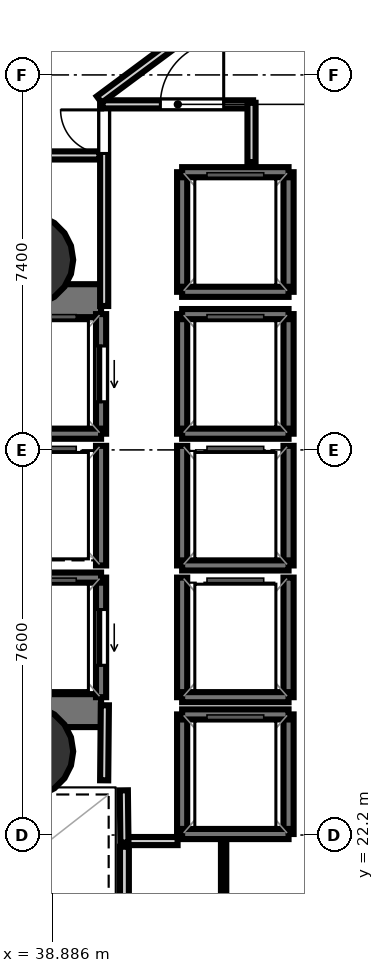
"""IFC4 building model, lengths in metres.
Left out: names, types, materials, properties, quantities, classifications, styles, units other than length and angle.
Written with IfcOpenShell. Run it as: python <this file> out.ifc"""

import sys

from ifc_helpers import new_model, si_unit, direction, frame, frame_2d, origin, origin_2d, place, context, subcontext, project, spatial, rectangle, hollow_circle, extrude, element, fill, save


model = new_model("IFC4")
c1 = context("Model", 3, precision=1e-05, world=origin(), true_north=direction((0.0, 1.0)))
c2 = subcontext(c1, "Body", "Model", "MODEL_VIEW")
j1 = project(units=[si_unit("LENGTHUNIT", "METRE"), si_unit("PLANEANGLEUNIT", "RADIAN")], contexts=[c1])
p1 = place(None, origin())
s1 = spatial("IfcSite", under=j1, at=p1, CompositionType="ELEMENT")
p2 = place(p1, origin())
s2 = spatial("IfcBuilding", under=s1, at=p2, CompositionType="ELEMENT")
p3 = place(p2, frame((0.0, 0.0, 44.2)))
s3 = spatial("IfcBuildingStorey", under=s2, at=p3, CompositionType="ELEMENT", Elevation=44.2)
p4 = place(p3, frame((29.13, 32.745, 0.0), z_axis=(0.0, 0.0, 1.0), x_axis=(1.0, 0.0, 0.0)))
e1 = element("IfcWall", 1, at=p4, inside=s3, PredefinedType="SHEAR", context=c2, shape_type="SweptSolid", body=[
    extrude(rectangle(XDim=10.72, YDim=0.65, at=frame_2d((5.36, 0.0))), origin(), (0.0, 0.0, 1.0), 3.4),
])
p5 = place(p4, frame((1.095, 0.0, 0.0)))
e2 = element("IfcOpeningElement", 2, at=p5, cuts=e1, PredefinedType="OPENING", context=c2, shape_type="SweptSolid", body=[
    extrude(rectangle(XDim=1.25, YDim=2.15, at=frame_2d((0.625, 1.075))), frame((0.0, 0.335, 0.0), z_axis=(0.0, -1.0, 0.0), x_axis=(1.0, 0.0, 0.0)), (0.0, 0.0, 1.0), 0.67),
])
p6 = place(p3, frame((29.13, 24.655, 0.0), z_axis=(0.0, 0.0, 1.0), x_axis=(1.0, 0.0, 0.0)))
e3 = element("IfcWall", 3, at=p6, inside=s3, PredefinedType="SHEAR", context=c2, shape_type="SweptSolid", body=[
    extrude(rectangle(XDim=10.72, YDim=0.65, at=frame_2d((5.36, 0.0))), origin(), (0.0, 0.0, 1.0), 3.4),
])
p7 = place(p6, frame((0.895, 0.0, 0.0)))
e4 = element("IfcOpeningElement", 4, at=p7, cuts=e3, PredefinedType="OPENING", context=c2, shape_type="SweptSolid", body=[
    extrude(rectangle(XDim=1.25, YDim=2.15, at=frame_2d((0.625, 1.075))), frame((0.0, 0.335, 0.0), z_axis=(0.0, -1.0, 0.0), x_axis=(1.0, 0.0, 0.0)), (0.0, 0.0, 1.0), 0.67),
])
for number, where, z_axis, x_axis in (
    (5, (38.4, 33.55, 0.0), (0.0, 0.0, 1.0), (1.0, 0.0, 0.0)),
    (6, (38.4, 23.85, 0.0), (0.0, 0.0, 1.0), (1.0, 0.0, 0.0)),
):
    element("IfcColumn", number, at=place(p3, frame(where, z_axis=z_axis, x_axis=x_axis)), inside=s3, PredefinedType="COLUMN", context=c2, shape_type="SweptSolid", body=[
        extrude(hollow_circle(Radius=0.9, WallThickness=0.045, at=origin_2d()), origin(), (0.0, 0.0, 1.0), 3.7),
    ])
p8 = place(p3, frame((39.85, 30.12, 0.0), z_axis=(0.0, 0.0, 1.0), x_axis=(0.0, 1.0, 0.0)))
e7 = element("IfcWall", 7, at=p8, inside=s3, PredefinedType="SOLIDWALL", context=c2, shape_type="SweptSolid", body=[
    extrude(rectangle(XDim=2.36, YDim=0.2, at=frame_2d((1.18, 0.0))), origin(), (0.0, 0.0, 1.0), 3.4),
])
p9 = place(p8, frame((0.63, 0.0, 0.0)))
e8 = element("IfcOpeningElement", 8, at=p9, cuts=e7, PredefinedType="OPENING", context=c2, shape_type="SweptSolid", body=[
    extrude(rectangle(XDim=1.1, YDim=2.15, at=frame_2d((0.55, 1.075))), frame((0.0, 0.11, 0.0), z_axis=(0.0, -1.0, 0.0), x_axis=(1.0, 0.0, 0.0)), (0.0, 0.0, 1.0), 0.22),
])
p10 = place(p3, frame((37.75, 30.12, 0.0), z_axis=(0.0, 0.0, 1.0), x_axis=(1.0, 0.0, 0.0)))
e9 = element("IfcWall", 9, at=p10, inside=s3, PredefinedType="SOLIDWALL", context=c2, shape_type="SweptSolid", body=[
    extrude(rectangle(XDim=2.1, YDim=0.2, at=frame_2d((1.05, 0.0))), origin(), (0.0, 0.0, 1.0), 3.4),
])
p11 = place(p3, frame((39.85, 24.92, 0.0), z_axis=(0.0, 0.0, 1.0), x_axis=(0.0, 1.0, 0.0)))
e10 = element("IfcWall", 10, at=p11, inside=s3, PredefinedType="SOLIDWALL", context=c2, shape_type="SweptSolid", body=[
    extrude(rectangle(XDim=2.36, YDim=0.2, at=frame_2d((1.18, 0.0))), origin(), (0.0, 0.0, 1.0), 3.4),
])
p12 = place(p11, frame((0.63, 0.0, 0.0)))
e11 = element("IfcOpeningElement", 11, at=p12, cuts=e10, PredefinedType="OPENING", context=c2, shape_type="SweptSolid", body=[
    extrude(rectangle(XDim=1.1, YDim=2.15, at=frame_2d((0.55, 1.075))), frame((0.0, 0.11, 0.0), z_axis=(0.0, -1.0, 0.0), x_axis=(1.0, 0.0, 0.0)), (0.0, 0.0, 1.0), 0.22),
])
p13 = place(p3, frame((37.75, 27.28, 0.0), z_axis=(0.0, 0.0, 1.0), x_axis=(1.0, 0.0, 0.0)))
e12 = element("IfcWall", 12, at=p13, inside=s3, PredefinedType="SOLIDWALL", context=c2, shape_type="SweptSolid", body=[
    extrude(rectangle(XDim=2.1, YDim=0.2, at=frame_2d((1.05, 0.0))), origin(), (0.0, 0.0, 1.0), 3.4),
])
for number, where, z_axis, x_axis in (
    (13, (43.55, 30.12, 0.0), (0.0, 0.0, 1.0), (0.0, 1.0, 0.0)),
    (14, (41.45, 30.12, 0.0), (0.0, 0.0, 1.0), (0.0, 1.0, 0.0)),
):
    element("IfcWall", number, at=place(p3, frame(where, z_axis=z_axis, x_axis=x_axis)), inside=s3, PredefinedType="SOLIDWALL", context=c2, shape_type="SweptSolid", body=[
        extrude(rectangle(XDim=2.36, YDim=0.2, at=frame_2d((1.18, 0.0))), origin(), (0.0, 0.0, 1.0), 3.4),
    ])
for number, where, z_axis, x_axis in (
    (15, (41.45, 32.48, 0.0), (0.0, 0.0, 1.0), (1.0, 0.0, 0.0)),
    (16, (41.45, 30.12, 0.0), (0.0, 0.0, 1.0), (1.0, 0.0, 0.0)),
):
    element("IfcWall", number, at=place(p3, frame(where, z_axis=z_axis, x_axis=x_axis)), inside=s3, PredefinedType="SOLIDWALL", context=c2, shape_type="SweptSolid", body=[
        extrude(rectangle(XDim=2.1, YDim=0.2, at=frame_2d((1.05, 0.0))), origin(), (0.0, 0.0, 1.0), 3.4),
    ])
for number, where, z_axis, x_axis in (
    (17, (43.55, 27.52, 0.0), (0.0, 0.0, 1.0), (0.0, 1.0, 0.0)),
    (18, (41.45, 27.52, 0.0), (0.0, 0.0, 1.0), (0.0, 1.0, 0.0)),
):
    element("IfcWall", number, at=place(p3, frame(where, z_axis=z_axis, x_axis=x_axis)), inside=s3, PredefinedType="SOLIDWALL", context=c2, shape_type="SweptSolid", body=[
        extrude(rectangle(XDim=2.36, YDim=0.2, at=frame_2d((1.18, 0.0))), origin(), (0.0, 0.0, 1.0), 3.4),
    ])
p14 = place(p3, frame((41.45, 27.52, 0.0), z_axis=(0.0, 0.0, 1.0), x_axis=(1.0, 0.0, 0.0)))
e19 = element("IfcWall", 19, at=p14, inside=s3, PredefinedType="SOLIDWALL", context=c2, shape_type="SweptSolid", body=[
    extrude(rectangle(XDim=2.1, YDim=0.2, at=frame_2d((1.05, 0.0))), origin(), (0.0, 0.0, 1.0), 3.4),
])
for number, where, z_axis, x_axis in (
    (20, (43.55, 24.92, 0.0), (0.0, 0.0, 1.0), (0.0, 1.0, 0.0)),
    (21, (41.45, 24.92, 0.0), (0.0, 0.0, 1.0), (0.0, 1.0, 0.0)),
):
    element("IfcWall", number, at=place(p3, frame(where, z_axis=z_axis, x_axis=x_axis)), inside=s3, PredefinedType="SOLIDWALL", context=c2, shape_type="SweptSolid", body=[
        extrude(rectangle(XDim=2.36, YDim=0.2, at=frame_2d((1.18, 0.0))), origin(), (0.0, 0.0, 1.0), 3.4),
    ])
p15 = place(p3, frame((41.45, 24.92, 0.0), z_axis=(0.0, 0.0, 1.0), x_axis=(1.0, 0.0, 0.0)))
e22 = element("IfcWall", 22, at=p15, inside=s3, PredefinedType="SOLIDWALL", context=c2, shape_type="SweptSolid", body=[
    extrude(rectangle(XDim=2.1, YDim=0.2, at=frame_2d((1.05, 0.0))), origin(), (0.0, 0.0, 1.0), 3.4),
])
p16 = place(p3, frame((39.85, 27.52, 0.0), z_axis=(0.0, 0.0, 1.0), x_axis=(0.0, 1.0, 0.0)))
e23 = element("IfcWall", 23, at=p16, inside=s3, PredefinedType="SOLIDWALL", context=c2, shape_type="SweptSolid", body=[
    extrude(rectangle(XDim=2.36, YDim=0.2, at=frame_2d((1.18, 0.0))), origin(), (0.0, 0.0, 1.0), 3.4),
])
for number, where, z_axis, x_axis in (
    (24, (43.55, 22.22, 0.0), (0.0, 0.0, 1.0), (0.0, 1.0, 0.0)),
    (25, (41.45, 22.22, 0.0), (0.0, 0.0, 1.0), (0.0, 1.0, 0.0)),
):
    element("IfcWall", number, at=place(p3, frame(where, z_axis=z_axis, x_axis=x_axis)), inside=s3, PredefinedType="SOLIDWALL", context=c2, shape_type="SweptSolid", body=[
        extrude(rectangle(XDim=2.36, YDim=0.2, at=frame_2d((1.18, 0.0))), origin(), (0.0, 0.0, 1.0), 3.4),
    ])
for number, where, z_axis, x_axis in (
    (26, (41.45, 24.58, 0.0), (0.0, 0.0, 1.0), (1.0, 0.0, 0.0)),
    (27, (41.45, 22.22, 0.0), (0.0, 0.0, 1.0), (1.0, 0.0, 0.0)),
):
    element("IfcWall", number, at=place(p3, frame(where, z_axis=z_axis, x_axis=x_axis)), inside=s3, PredefinedType="SOLIDWALL", context=c2, shape_type="SweptSolid", body=[
        extrude(rectangle(XDim=2.1, YDim=0.2, at=frame_2d((1.05, 0.0))), origin(), (0.0, 0.0, 1.0), 3.4),
    ])
for number, where, z_axis, x_axis in (
    (28, (43.55, 32.92, 0.0), (0.0, 0.0, 1.0), (0.0, 1.0, 0.0)),
    (29, (41.45, 32.92, 0.0), (0.0, 0.0, 1.0), (0.0, 1.0, 0.0)),
):
    element("IfcWall", number, at=place(p3, frame(where, z_axis=z_axis, x_axis=x_axis)), inside=s3, PredefinedType="SOLIDWALL", context=c2, shape_type="SweptSolid", body=[
        extrude(rectangle(XDim=2.36, YDim=0.2, at=frame_2d((1.18, 0.0))), origin(), (0.0, 0.0, 1.0), 3.4),
    ])
for number, where, z_axis, x_axis in (
    (30, (41.45, 35.28, 0.0), (0.0, 0.0, 1.0), (1.0, 0.0, 0.0)),
    (31, (41.45, 32.92, 0.0), (0.0, 0.0, 1.0), (1.0, 0.0, 0.0)),
):
    element("IfcWall", number, at=place(p3, frame(where, z_axis=z_axis, x_axis=x_axis)), inside=s3, PredefinedType="SOLIDWALL", context=c2, shape_type="SweptSolid", body=[
        extrude(rectangle(XDim=2.1, YDim=0.2, at=frame_2d((1.05, 0.0))), origin(), (0.0, 0.0, 1.0), 3.4),
    ])
p17 = place(p3, frame((39.911, 32.64, 0.0), z_axis=(0.0, 0.0, 1.0), x_axis=(0.0, 1.0, 0.0)))
e32 = element("IfcWall", 32, at=p17, inside=s3, PredefinedType="PARTITIONING", context=c2, shape_type="SweptSolid", body=[
    extrude(rectangle(XDim=4.01, YDim=0.16, at=frame_2d((2.005, 0.0))), origin(), (0.0, 0.0, 1.0), 2.72),
])
p18 = place(p17, frame((3.01, 0.0, 0.0)))
e33 = element("IfcOpeningElement", 33, at=p18, cuts=e32, PredefinedType="OPENING", context=c2, shape_type="SweptSolid", body=[
    extrude(rectangle(XDim=0.86, YDim=2.05, at=frame_2d((0.43, 1.025))), frame((0.0, 0.09, 0.0), z_axis=(0.0, -1.0, 0.0), x_axis=(1.0, 0.0, 0.0)), (0.0, 0.0, 1.0), 0.18),
])
p19 = place(p3, frame((39.88, 36.619, 0.0), z_axis=(0.0, 0.0, 1.0), x_axis=(1.0, 0.0, 0.0)))
e34 = element("IfcWall", 34, at=p19, inside=s3, PredefinedType="PARTITIONING", context=c2, shape_type="SweptSolid", body=[
    extrude(rectangle(XDim=2.97, YDim=0.16, at=frame_2d((1.485, 0.0))), origin(), (0.0, 0.0, 1.0), 2.72),
])
p20 = place(p19, frame((1.14, 0.0, 0.0)))
e35 = element("IfcOpeningElement", 35, at=p20, cuts=e34, PredefinedType="OPENING", context=c2, shape_type="SweptSolid", body=[
    extrude(rectangle(XDim=1.25, YDim=2.2, at=frame_2d((0.625, 1.1))), frame((0.0, 0.09, 0.0), z_axis=(0.0, -1.0, 0.0), x_axis=(1.0, 0.0, 0.0)), (0.0, 0.0, 1.0), 0.18),
])
p21 = place(p3, frame((42.819, 36.65, 0.0), z_axis=(0.0, 0.0, 1.0), x_axis=(0.0, -1.0, 0.0)))
e36 = element("IfcWall", 36, at=p21, inside=s3, PredefinedType="PARTITIONING", context=c2, shape_type="SweptSolid", body=[
    extrude(rectangle(XDim=1.17, YDim=0.16, at=frame_2d((0.585, 0.0))), origin(), (0.0, 0.0, 1.0), 2.72),
])
p22 = place(p3, frame((41.36, 22.081, 0.0), z_axis=(0.0, 0.0, 1.0), x_axis=(-1.0, 0.0, 0.0)))
e37 = element("IfcWall", 37, at=p22, inside=s3, PredefinedType="PARTITIONING", context=c2, shape_type="SweptSolid", body=[
    extrude(rectangle(XDim=1.08, YDim=0.16, at=frame_2d((0.54, 0.0))), origin(), (0.0, 0.0, 1.0), 2.72),
])
p23 = place(p3, frame((40.311, 22.05, 0.0), z_axis=(0.0, 0.0, 1.0), x_axis=(-0.011836292006, 0.999929948642, 0.0)))
e38 = element("IfcWall", 38, at=p23, inside=s3, PredefinedType="PARTITIONING", context=c2, shape_type="SweptSolid", body=[
    extrude(rectangle(XDim=1.031, YDim=0.16, at=frame_2d((0.516, 0.0))), origin(), (0.0, 0.0, 1.0), 2.72),
])
p24 = place(p3, frame((39.911, 23.28, 0.0), z_axis=(0.0, 0.0, 1.0), x_axis=(0.009397771291, 0.999955839972, 0.0)))
e39 = element("IfcWall", 39, at=p24, inside=s3, PredefinedType="PARTITIONING", context=c2, shape_type="SweptSolid", body=[
    extrude(rectangle(XDim=1.481, YDim=0.16, at=frame_2d((0.74, 0.0))), origin(), (0.0, 0.0, 1.0), 2.72),
])
p25 = place(p3, frame((42.185, 38.475, 0.0), z_axis=(0.0, 0.0, 1.0), x_axis=(-0.802818467394, -0.596223538961, 0.0)))
e40 = element("IfcWall", 40, at=p25, inside=s3, PredefinedType="PARTITIONING", context=c2, shape_type="SweptSolid", body=[
    extrude(rectangle(XDim=2.953, YDim=0.16, at=frame_2d((1.477, 0.0))), origin(), (0.0, 0.0, 1.0), 2.678),
])
p26 = place(p3, frame((39.818, 35.611, 0.0), z_axis=(0.0, 0.0, 1.0), x_axis=(-1.0, 0.0, 0.0)))
e41 = element("IfcWall", 41, at=p26, inside=s3, PredefinedType="PARTITIONING", context=c2, shape_type="SweptSolid", body=[
    extrude(rectangle(XDim=2.968, YDim=0.16, at=frame_2d((1.484, 0.0))), origin(), (0.0, 0.0, 1.0), 2.72),
])
p27 = place(p3, frame((37.896, 44.548, 0.0), z_axis=(0.0, 0.0, 1.0), x_axis=(0.674902776071, -0.737906662697, 0.0)))
e42 = element("IfcWall", 42, at=p27, inside=s3, PredefinedType="PARTITIONING", context=c2, shape_type="SweptSolid", body=[
    extrude(rectangle(XDim=31.144, YDim=0.105, at=frame_2d((15.572, 0.0))), origin(), (0.0, 0.0, 1.0), 2.678),
])
p28 = place(p3, frame((42.269, 12.687, 0.0), z_axis=(0.0, 0.0, 1.0), x_axis=(-2.6047772e-05, 0.999999999661, 0.0)))
e43 = element("IfcWall", 43, at=p28, inside=s3, PredefinedType="PARTITIONING", context=c2, shape_type="SweptSolid", body=[
    extrude(rectangle(XDim=9.373, YDim=0.105, at=frame_2d((4.687, 0.0))), origin(), (0.0, 0.0, 1.0), 2.678),
])
p29 = place(p3, frame((40.311, 18.0, 0.0), z_axis=(0.0, 0.0, 1.0), x_axis=(0.0, 1.0, 0.0)))
e44 = element("IfcWall", 44, at=p29, inside=s3, PredefinedType="PLUMBINGWALL", context=c2, shape_type="SweptSolid", body=[
    extrude(rectangle(XDim=3.97, YDim=0.175, at=frame_2d((1.985, 0.0))), origin(), (0.0, 0.0, 1.0), 2.72),
])
p30 = place(p9, origin())
e45 = element("IfcDoor", 45, at=p30, inside=s3, OperationType="SLIDING_TO_LEFT", PredefinedType="DOOR", context=c2, shape_type="SweptSolid", body=[
    extrude(rectangle(XDim=1.1, YDim=2.15, at=frame_2d((0.55, 1.075))), frame((0.0, 0.025, 0.0), z_axis=(0.0, -1.0, 0.0), x_axis=(1.0, 0.0, 0.0)), (0.0, 0.0, 1.0), 0.05),
])
fill(e8, e45)
p31 = place(p12, origin())
e46 = element("IfcDoor", 46, at=p31, inside=s3, OperationType="SLIDING_TO_LEFT", PredefinedType="DOOR", context=c2, shape_type="SweptSolid", body=[
    extrude(rectangle(XDim=1.1, YDim=2.15, at=frame_2d((0.55, 1.075))), frame((0.0, 0.025, 0.0), z_axis=(0.0, -1.0, 0.0), x_axis=(1.0, 0.0, 0.0)), (0.0, 0.0, 1.0), 0.05),
])
fill(e11, e46)
p32 = place(p18, origin())
e47 = element("IfcDoor", 47, at=p32, inside=s3, OperationType="SINGLE_SWING_RIGHT", PredefinedType="DOOR", context=c2, shape_type="SweptSolid", body=[
    extrude(rectangle(XDim=0.86, YDim=2.05, at=frame_2d((0.43, 1.025))), frame((0.0, 0.025, 0.0), z_axis=(0.0, -1.0, 0.0), x_axis=(1.0, 0.0, 0.0)), (0.0, 0.0, 1.0), 0.05),
])
fill(e33, e47)
p33 = place(p20, origin())
e48 = element("IfcDoor", 48, at=p33, inside=s3, OperationType="SINGLE_SWING_RIGHT", PredefinedType="DOOR", context=c2, shape_type="SweptSolid", body=[
    extrude(rectangle(XDim=1.25, YDim=2.2, at=frame_2d((0.625, 1.1))), frame((0.0, 0.025, 0.0), z_axis=(0.0, -1.0, 0.0), x_axis=(1.0, 0.0, 0.0)), (0.0, 0.0, 1.0), 0.05),
])
fill(e35, e48)
save(model, sys.argv[1])
